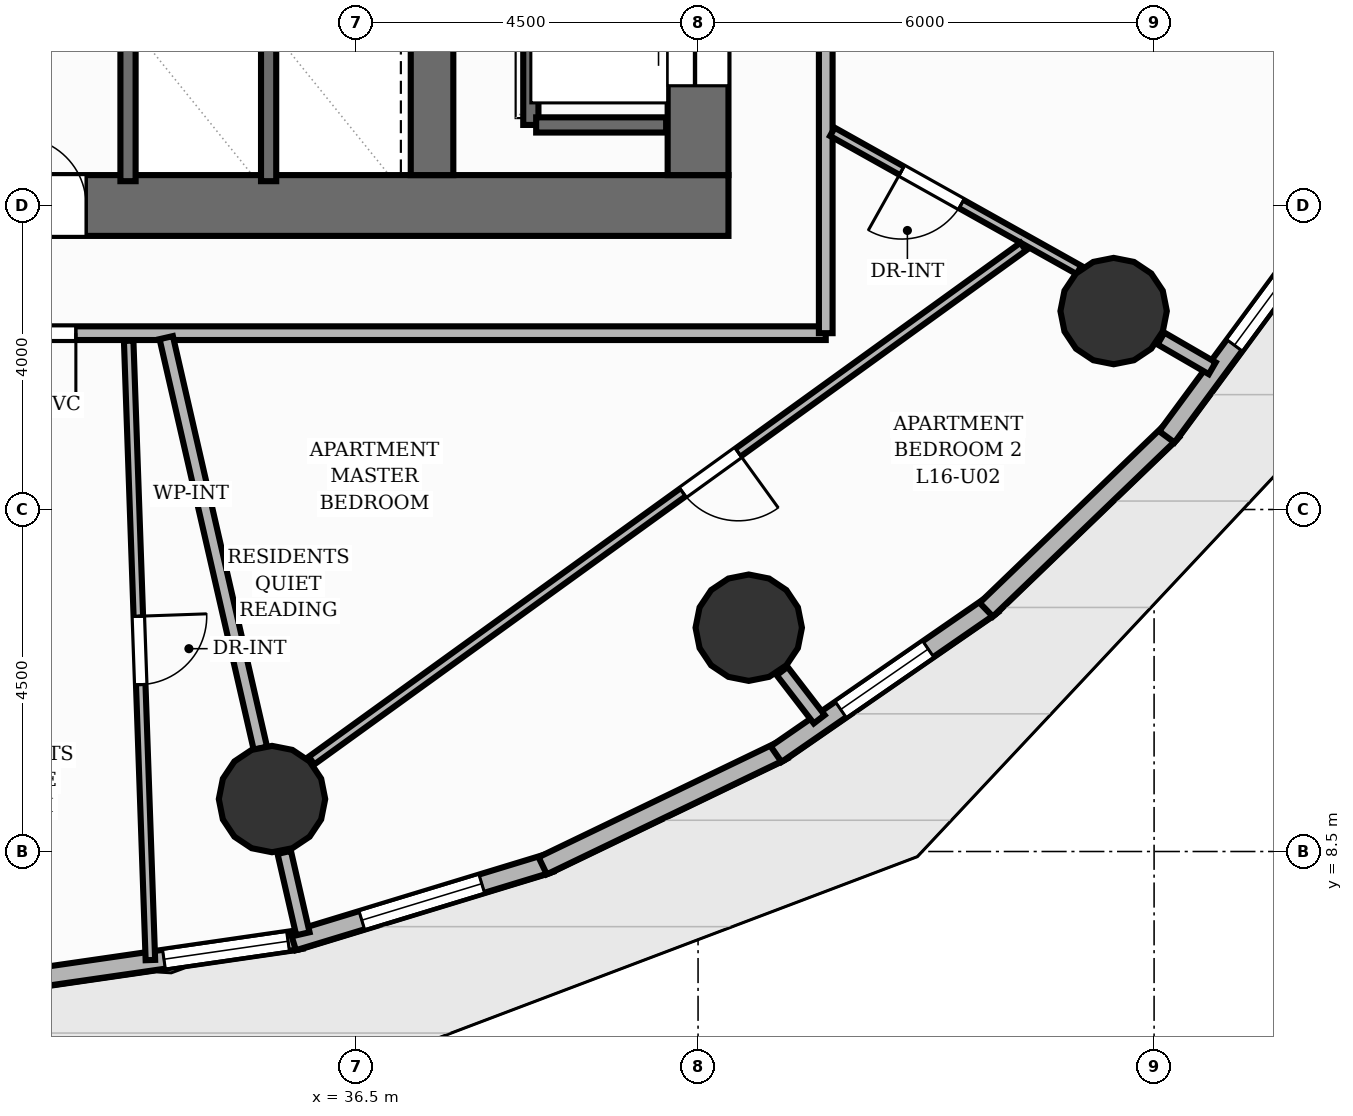
"""IFC4 building model, lengths in metres.
Left out: names, types, materials, properties, quantities, classifications, styles, units other than length and angle.
Written with IfcOpenShell. Run it as: python <this file> out.ifc"""

import sys

from ifc_helpers import new_model, si_unit, direction, frame, frame_2d, origin, origin_2d, place, context, subcontext, project, spatial, rectangle, circle, extrude, element, fill, save


model = new_model("IFC4")
c1 = context("Model", 3, precision=1e-05, world=origin(), true_north=direction((0.0, 1.0)))
c2 = subcontext(c1, "Body", "Model", "MODEL_VIEW")
j1 = project(units=[si_unit("LENGTHUNIT", "METRE"), si_unit("PLANEANGLEUNIT", "RADIAN")], contexts=[c1])
p1 = place(None, origin())
s1 = spatial("IfcSite", under=j1, at=p1, CompositionType="ELEMENT")
p2 = place(p1, origin())
s2 = spatial("IfcBuilding", under=s1, at=p2, CompositionType="ELEMENT")
p3 = place(p2, frame((0.0, 0.0, 56.8)))
s3 = spatial("IfcBuildingStorey", under=s2, at=p3, CompositionType="ELEMENT", Elevation=56.8)
p4 = place(p3, frame((22.6, 17.0, 0.0), z_axis=(0.0, 0.0, 1.0), x_axis=(1.0, 0.0, 0.0)))
e1 = element("IfcWall", 1, at=p4, inside=s3, PredefinedType="SHEAR", context=c2, shape_type="SweptSolid", body=[
    extrude(rectangle(XDim=18.8, YDim=0.8, at=frame_2d((9.4, 0.0))), origin(), (0.0, 0.0, 1.0), 3.2),
])
p5 = place(p4, frame((5.9, 0.0, 0.0)))
e2 = element("IfcOpeningElement", 2, at=p5, cuts=e1, PredefinedType="OPENING", context=c2, shape_type="SweptSolid", body=[
    extrude(rectangle(XDim=1.1, YDim=2.15, at=frame_2d((0.55, 1.075))), frame((0.0, 0.41, 0.0), z_axis=(0.0, -1.0, 0.0), x_axis=(1.0, 0.0, 0.0)), (0.0, 0.0, 1.0), 0.82),
])
p6 = place(p4, frame((9.45, 0.0, 0.0)))
e3 = element("IfcOpeningElement", 3, at=p6, cuts=e1, PredefinedType="OPENING", context=c2, shape_type="SweptSolid", body=[
    extrude(rectangle(XDim=0.9, YDim=2.1, at=frame_2d((0.45, 1.05))), frame((0.0, 0.41, 0.0), z_axis=(0.0, -1.0, 0.0), x_axis=(1.0, 0.0, 0.0)), (0.0, 0.0, 1.0), 0.82),
])
p7 = place(p3, frame((41.0, 17.4, 0.0), z_axis=(0.0, 0.0, 1.0), x_axis=(0.0, 1.0, 0.0)))
e4 = element("IfcWall", 4, at=p7, inside=s3, PredefinedType="SHEAR", context=c2, shape_type="SweptSolid", body=[
    extrude(rectangle(XDim=13.2, YDim=0.8, at=frame_2d((6.6, 0.0))), origin(), (0.0, 0.0, 1.0), 3.2),
])
p8 = place(p7, frame((1.175, 0.0, 0.0)))
e5 = element("IfcOpeningElement", 5, at=p8, cuts=e4, PredefinedType="OPENING", context=c2, shape_type="SweptSolid", body=[
    extrude(rectangle(XDim=1.05, YDim=2.15, at=frame_2d((0.525, 1.075))), frame((0.0, 0.41, 0.0), z_axis=(0.0, -1.0, 0.0), x_axis=(1.0, 0.0, 0.0)), (0.0, 0.0, 1.0), 0.82),
])
p9 = place(p7, frame((4.425, 0.0, 0.0)))
e6 = element("IfcOpeningElement", 6, at=p9, cuts=e4, PredefinedType="OPENING", context=c2, shape_type="SweptSolid", body=[
    extrude(rectangle(XDim=1.05, YDim=2.15, at=frame_2d((0.525, 1.075))), frame((0.0, 0.41, 0.0), z_axis=(0.0, -1.0, 0.0), x_axis=(1.0, 0.0, 0.0)), (0.0, 0.0, 1.0), 0.82),
])
p10 = place(p7, frame((7.725, 0.0, 0.0)))
e7 = element("IfcOpeningElement", 7, at=p10, cuts=e4, PredefinedType="OPENING", context=c2, shape_type="SweptSolid", body=[
    extrude(rectangle(XDim=1.05, YDim=2.15, at=frame_2d((0.525, 1.075))), frame((0.0, 0.41, 0.0), z_axis=(0.0, -1.0, 0.0), x_axis=(1.0, 0.0, 0.0)), (0.0, 0.0, 1.0), 0.82),
])
p11 = place(p7, frame((10.975, 0.0, 0.0)))
e8 = element("IfcOpeningElement", 8, at=p11, cuts=e4, PredefinedType="OPENING", context=c2, shape_type="SweptSolid", body=[
    extrude(rectangle(XDim=1.05, YDim=2.15, at=frame_2d((0.525, 1.075))), frame((0.0, 0.41, 0.0), z_axis=(0.0, -1.0, 0.0), x_axis=(1.0, 0.0, 0.0)), (0.0, 0.0, 1.0), 0.82),
])
p12 = place(p3, frame((37.5, 17.4, 0.0), z_axis=(0.0, 0.0, 1.0), x_axis=(0.0, 1.0, 0.0)))
e9 = element("IfcWall", 9, at=p12, inside=s3, PredefinedType="SHEAR", context=c2, shape_type="SweptSolid", body=[
    extrude(rectangle(XDim=13.2, YDim=0.56, at=frame_2d((6.6, 0.0))), origin(), (0.0, 0.0, 1.0), 3.2),
])
for number, where, z_axis, x_axis in (
    (10, (35.395, 9.19, 0.0), (0.0, 0.0, 1.0), (1.0, 0.0, 0.0)),
    (11, (41.667, 11.445, 0.0), (0.0, 0.0, 1.0), (1.0, 0.0, 0.0)),
    (12, (46.468, 15.611, 0.0), (0.0, 0.0, 1.0), (1.0, 0.0, 0.0)),
):
    element("IfcColumn", number, at=place(p3, frame(where, z_axis=z_axis, x_axis=x_axis)), inside=s3, PredefinedType="COLUMN", context=c2, shape_type="SweptSolid", body=[
        extrude(circle(Radius=0.7, at=origin_2d()), origin(), (0.0, 0.0, 1.0), 3.2),
    ])
p13 = place(p3, frame((35.779, 7.344, 0.0), z_axis=(0.0, 0.0, 1.0), x_axis=(-0.989638017979, -0.143584795051, 0.0)))
e13 = element("IfcWall", 13, at=p13, inside=s3, PredefinedType="SOLIDWALL", context=c2, shape_type="SweptSolid", body=[
    extrude(rectangle(XDim=3.538, YDim=0.25, at=frame_2d((1.769, 0.0))), origin(), (0.0, 0.0, 1.0), 2.96),
])
p14 = place(p13, frame((0.175, 0.0, 0.85)))
e14 = element("IfcOpeningElement", 14, at=p14, cuts=e13, PredefinedType="OPENING", context=c2, shape_type="SweptSolid", body=[
    extrude(rectangle(XDim=1.65, YDim=1.29, at=frame_2d((0.825, 0.645))), frame((0.0, 0.135, 0.0), z_axis=(0.0, -1.0, 0.0), x_axis=(1.0, 0.0, 0.0)), (0.0, 0.0, 1.0), 0.27),
])
p15 = place(p3, frame((39.057, 8.352, 0.0), z_axis=(0.0, 0.0, 1.0), x_axis=(-0.95658107252, -0.291466381759, 0.0)))
e15 = element("IfcWall", 15, at=p15, inside=s3, PredefinedType="SOLIDWALL", context=c2, shape_type="SweptSolid", body=[
    extrude(rectangle(XDim=3.538, YDim=0.25, at=frame_2d((1.769, 0.0))), origin(), (0.0, 0.0, 1.0), 2.96),
])
p16 = place(p15, frame((0.944, 0.0, 0.85)))
e16 = element("IfcOpeningElement", 16, at=p16, cuts=e15, PredefinedType="OPENING", context=c2, shape_type="SweptSolid", body=[
    extrude(rectangle(XDim=1.65, YDim=1.55, at=frame_2d((0.825, 0.775))), frame((0.0, 0.135, 0.0), z_axis=(0.0, -1.0, 0.0), x_axis=(1.0, 0.0, 0.0)), (0.0, 0.0, 1.0), 0.27),
])
p17 = place(p3, frame((42.121, 9.836, 0.0), z_axis=(0.0, 0.0, 1.0), x_axis=(-0.901067057596, -0.433679787073, 0.0)))
e17 = element("IfcWall", 17, at=p17, inside=s3, PredefinedType="SOLIDWALL", context=c2, shape_type="SweptSolid", body=[
    extrude(rectangle(XDim=3.513, YDim=0.25, at=frame_2d((1.756, 0.0))), origin(), (0.0, 0.0, 1.0), 2.96),
])
p18 = place(p3, frame((44.877, 11.751, 0.0), z_axis=(0.0, 0.0, 1.0), x_axis=(-0.822610496702, -0.568605285515, 0.0)))
e18 = element("IfcWall", 18, at=p18, inside=s3, PredefinedType="SOLIDWALL", context=c2, shape_type="SweptSolid", body=[
    extrude(rectangle(XDim=3.465, YDim=0.25, at=frame_2d((1.732, 0.0))), origin(), (0.0, 0.0, 1.0), 2.96),
])
p19 = place(p18, frame((1.032, 0.0, 0.85)))
e19 = element("IfcOpeningElement", 19, at=p19, cuts=e18, PredefinedType="OPENING", context=c2, shape_type="SweptSolid", body=[
    extrude(rectangle(XDim=1.4, YDim=1.29, at=frame_2d((0.7, 0.645))), frame((0.0, 0.135, 0.0), z_axis=(0.0, -1.0, 0.0), x_axis=(1.0, 0.0, 0.0)), (0.0, 0.0, 1.0), 0.27),
])
p20 = place(p3, frame((47.24, 14.039, 0.0), z_axis=(0.0, 0.0, 1.0), x_axis=(-0.720340150583, -0.693620982568, 0.0)))
e20 = element("IfcWall", 20, at=p20, inside=s3, PredefinedType="SOLIDWALL", context=c2, shape_type="SweptSolid", body=[
    extrude(rectangle(XDim=3.399, YDim=0.25, at=frame_2d((1.7, 0.0))), origin(), (0.0, 0.0, 1.0), 2.96),
])
p21 = place(p3, frame((49.14, 16.629, 0.0), z_axis=(0.0, 0.0, 1.0), x_axis=(-0.593762827217, -0.804640109003, 0.0)))
e21 = element("IfcWall", 21, at=p21, inside=s3, PredefinedType="SOLIDWALL", context=c2, shape_type="SweptSolid", body=[
    extrude(rectangle(XDim=3.323, YDim=0.25, at=frame_2d((1.661, 0.0))), origin(), (0.0, 0.0, 1.0), 2.96),
])
p22 = place(p21, frame((0.175, 0.0, 0.85)))
e22 = element("IfcOpeningElement", 22, at=p22, cuts=e21, PredefinedType="OPENING", context=c2, shape_type="SweptSolid", body=[
    extrude(rectangle(XDim=1.65, YDim=1.55, at=frame_2d((0.825, 0.775))), frame((0.0, 0.135, 0.0), z_axis=(0.0, -1.0, 0.0), x_axis=(1.0, 0.0, 0.0)), (0.0, 0.0, 1.0), 0.27),
])
p23 = place(p3, frame((38.8, 18.06, 0.0), z_axis=(0.0, 0.0, 1.0), x_axis=(0.0, 1.0, 0.0)))
e23 = element("IfcWall", 23, at=p23, inside=s3, PredefinedType="SHEAR", context=c2, shape_type="SweptSolid", body=[
    extrude(rectangle(XDim=11.88, YDim=0.2, at=frame_2d((5.94, 0.0))), origin(), (0.0, 0.0, 1.0), 3.2),
])
p24 = place(p3, frame((38.87, 18.06, 0.0), z_axis=(0.0, 0.0, 1.0), x_axis=(1.0, 0.0, 0.0)))
e24 = element("IfcWall", 24, at=p24, inside=s3, PredefinedType="SHEAR", context=c2, shape_type="SweptSolid", body=[
    extrude(rectangle(XDim=1.71, YDim=0.2, at=frame_2d((0.855, 0.0))), origin(), (0.0, 0.0, 1.0), 3.2),
])
for number, where, z_axis, x_axis in (
    (25, (33.5, 17.32, 0.0), (0.0, 0.0, 1.0), (0.0, 1.0, 0.0)),
    (26, (35.35, 17.32, 0.0), (0.0, 0.0, 1.0), (0.0, 1.0, 0.0)),
):
    element("IfcWall", number, at=place(p3, frame(where, z_axis=z_axis, x_axis=x_axis)), inside=s3, PredefinedType="SHEAR", context=c2, shape_type="SweptSolid", body=[
        extrude(rectangle(XDim=1.86, YDim=0.2, at=frame_2d((0.93, 0.0))), origin(), (0.0, 0.0, 1.0), 3.2),
    ])
p25 = place(p3, frame((35.555, 8.488, 0.0), z_axis=(0.0, 0.0, 1.0), x_axis=(0.223512485262, -0.974701066446, 0.0)))
e27 = element("IfcWall", 27, at=p25, inside=s3, PredefinedType="PARTITIONING", context=c2, shape_type="SweptSolid", body=[
    extrude(rectangle(XDim=1.099, YDim=0.18, at=frame_2d((0.549, 0.0))), origin(), (0.0, 0.0, 1.0), 2.178),
])
p26 = place(p3, frame((42.106, 10.874, 0.0), z_axis=(0.0, 0.0, 1.0), x_axis=(0.609961416057, -0.792431114307, 0.0)))
e28 = element("IfcWall", 28, at=p26, inside=s3, PredefinedType="PARTITIONING", context=c2, shape_type="SweptSolid", body=[
    extrude(rectangle(XDim=0.8, YDim=0.18, at=frame_2d((0.4, 0.0))), origin(), (0.0, 0.0, 1.0), 2.178),
])
p27 = place(p3, frame((47.091, 15.25, 0.0), z_axis=(0.0, 0.0, 1.0), x_axis=(0.86504748832, -0.501689986895, 0.0)))
e29 = element("IfcWall", 29, at=p27, inside=s3, PredefinedType="PARTITIONING", context=c2, shape_type="SweptSolid", body=[
    extrude(rectangle(XDim=0.78, YDim=0.18, at=frame_2d((0.39, 0.0))), origin(), (0.0, 0.0, 1.0), 2.178),
])
p28 = place(p3, frame((42.68, 15.32, 0.0), z_axis=(0.0, 0.0, 1.0), x_axis=(-1.0, 0.0, 0.0)))
e30 = element("IfcWall", 30, at=p28, inside=s3, PredefinedType="PARTITIONING", context=c2, shape_type="SweptSolid", body=[
    extrude(rectangle(XDim=13.87, YDim=0.18, at=frame_2d((6.935, 0.0))), origin(), (0.0, 0.0, 1.0), 2.955),
])
p29 = place(p28, frame((9.866, 0.0, 0.0)))
e31 = element("IfcOpeningElement", 31, at=p29, cuts=e30, PredefinedType="OPENING", context=c2, shape_type="SweptSolid", body=[
    extrude(rectangle(XDim=0.9, YDim=2.1, at=frame_2d((0.45, 1.05))), frame((0.0, 0.1, 0.0), z_axis=(0.0, -1.0, 0.0), x_axis=(1.0, 0.0, 0.0)), (0.0, 0.0, 1.0), 0.2),
])
p30 = place(p3, frame((42.68, 30.109, 0.0), z_axis=(0.0, 0.0, 1.0), x_axis=(0.0, -1.0, 0.0)))
e32 = element("IfcWall", 32, at=p30, inside=s3, PredefinedType="PARTITIONING", context=c2, shape_type="SweptSolid", body=[
    extrude(rectangle(XDim=14.789, YDim=0.18, at=frame_2d((7.395, 0.0))), origin(), (0.0, 0.0, 1.0), 2.955),
])
p31 = place(p30, frame((9.4, 0.0, 0.0)))
e33 = element("IfcOpeningElement", 33, at=p31, cuts=e32, PredefinedType="OPENING", context=c2, shape_type="SweptSolid", body=[
    extrude(rectangle(XDim=1.05, YDim=2.15, at=frame_2d((0.525, 1.075))), frame((0.0, 0.1, 0.0), z_axis=(0.0, -1.0, 0.0), x_axis=(1.0, 0.0, 0.0)), (0.0, 0.0, 1.0), 0.2),
])
p32 = place(p3, frame((33.509, 15.22, 0.0), z_axis=(0.0, 0.0, 1.0), x_axis=(0.035033610305, -0.999386134659, 0.0)))
e34 = element("IfcWall", 34, at=p32, inside=s3, PredefinedType="PARTITIONING", context=c2, shape_type="SweptSolid", body=[
    extrude(rectangle(XDim=8.154, YDim=0.125, at=frame_2d((4.077, 0.0))), origin(), (0.0, 0.0, 1.0), 2.955),
])
p33 = place(p32, frame((3.627, 0.0, 0.0)))
e35 = element("IfcOpeningElement", 35, at=p33, cuts=e34, PredefinedType="OPENING", context=c2, shape_type="SweptSolid", body=[
    extrude(rectangle(XDim=0.9, YDim=2.1, at=frame_2d((0.45, 1.05))), frame((0.0, 0.073, 0.0), z_axis=(0.0, -1.0, 0.0), x_axis=(1.0, 0.0, 0.0)), (0.0, 0.0, 1.0), 0.145),
])
p34 = place(p3, frame((34.003, 15.261, 0.0), z_axis=(0.0, 0.0, 1.0), x_axis=(0.22340578764, -0.974725527546, 0.0)))
e36 = element("IfcWall", 36, at=p34, inside=s3, PredefinedType="PARTITIONING", context=c2, shape_type="SweptSolid", body=[
    extrude(rectangle(XDim=5.545, YDim=0.18, at=frame_2d((2.772, 0.0))), origin(), (0.0, 0.0, 1.0), 2.178),
])
p35 = place(p3, frame((46.011, 16.152, 0.0), z_axis=(0.0, 0.0, 1.0), x_axis=(-0.872501537555, 0.488611365978, 0.0)))
e37 = element("IfcWall", 37, at=p35, inside=s3, PredefinedType="PARTITIONING", context=c2, shape_type="SweptSolid", body=[
    extrude(rectangle(XDim=3.719, YDim=0.125, at=frame_2d((1.859, 0.0))), origin(), (0.0, 0.0, 1.0), 2.178),
])
p36 = place(p35, frame((1.773, 0.0, 0.0)))
e38 = element("IfcOpeningElement", 38, at=p36, cuts=e37, PredefinedType="OPENING", context=c2, shape_type="SweptSolid", body=[
    extrude(rectangle(XDim=0.9, YDim=2.1, at=frame_2d((0.45, 1.05))), frame((0.0, 0.073, 0.0), z_axis=(0.0, -1.0, 0.0), x_axis=(1.0, 0.0, 0.0)), (0.0, 0.0, 1.0), 0.145),
])
p37 = place(p3, frame((45.278, 16.459, 0.0), z_axis=(0.0, 0.0, 1.0), x_axis=(-0.810668637761, -0.585505217526, 0.0)))
e39 = element("IfcWall", 39, at=p37, inside=s3, PredefinedType="PARTITIONING", context=c2, shape_type="SweptSolid", body=[
    extrude(rectangle(XDim=11.55, YDim=0.125, at=frame_2d((5.775, 0.0))), origin(), (0.0, 0.0, 1.0), 2.955),
])
p38 = place(p37, frame((4.625, 0.0, 0.0)))
e40 = element("IfcOpeningElement", 40, at=p38, cuts=e39, PredefinedType="OPENING", context=c2, shape_type="SweptSolid", body=[
    extrude(rectangle(XDim=0.9, YDim=2.1, at=frame_2d((0.45, 1.05))), frame((0.0, 0.073, 0.0), z_axis=(0.0, -1.0, 0.0), x_axis=(1.0, 0.0, 0.0)), (0.0, 0.0, 1.0), 0.145),
])
p39 = place(p14, origin())
e41 = element("IfcWindow", 41, at=p39, inside=s3, PartitioningType="SINGLE_PANEL", PredefinedType="WINDOW", context=c2, shape_type="SweptSolid", body=[
    extrude(rectangle(XDim=1.65, YDim=1.29, at=frame_2d((0.825, 0.645))), frame((0.0, 0.03, 0.0), z_axis=(0.0, -1.0, 0.0), x_axis=(1.0, 0.0, 0.0)), (0.0, 0.0, 1.0), 0.06),
])
fill(e14, e41)
p40 = place(p16, origin())
e42 = element("IfcWindow", 42, at=p40, inside=s3, PartitioningType="SINGLE_PANEL", PredefinedType="WINDOW", context=c2, shape_type="SweptSolid", body=[
    extrude(rectangle(XDim=1.65, YDim=1.55, at=frame_2d((0.825, 0.775))), frame((0.0, 0.03, 0.0), z_axis=(0.0, -1.0, 0.0), x_axis=(1.0, 0.0, 0.0)), (0.0, 0.0, 1.0), 0.06),
])
fill(e16, e42)
p41 = place(p19, origin())
e43 = element("IfcWindow", 43, at=p41, inside=s3, PartitioningType="SINGLE_PANEL", PredefinedType="WINDOW", context=c2, shape_type="SweptSolid", body=[
    extrude(rectangle(XDim=1.4, YDim=1.29, at=frame_2d((0.7, 0.645))), frame((0.0, 0.03, 0.0), z_axis=(0.0, -1.0, 0.0), x_axis=(1.0, 0.0, 0.0)), (0.0, 0.0, 1.0), 0.06),
])
fill(e19, e43)
p42 = place(p22, origin())
e44 = element("IfcWindow", 44, at=p42, inside=s3, PartitioningType="SINGLE_PANEL", PredefinedType="WINDOW", context=c2, shape_type="SweptSolid", body=[
    extrude(rectangle(XDim=1.65, YDim=1.55, at=frame_2d((0.825, 0.775))), frame((0.0, 0.03, 0.0), z_axis=(0.0, -1.0, 0.0), x_axis=(1.0, 0.0, 0.0)), (0.0, 0.0, 1.0), 0.06),
])
fill(e22, e44)
p43 = place(p8, origin())
e45 = element("IfcDoor", 45, at=p43, inside=s3, OperationType="DOUBLE_DOOR_SLIDING", PredefinedType="DOOR", context=c2, shape_type="SweptSolid", body=[
    extrude(rectangle(XDim=1.05, YDim=2.15, at=frame_2d((0.525, 1.075))), frame((0.0, 0.025, 0.0), z_axis=(0.0, -1.0, 0.0), x_axis=(1.0, 0.0, 0.0)), (0.0, 0.0, 1.0), 0.05),
])
fill(e5, e45)
p44 = place(p6, origin())
e46 = element("IfcDoor", 46, at=p44, inside=s3, OperationType="SINGLE_SWING_LEFT", PredefinedType="DOOR", context=c2, shape_type="SweptSolid", body=[
    extrude(rectangle(XDim=0.9, YDim=2.1, at=frame_2d((0.45, 1.05))), frame((0.0, 0.025, 0.0), z_axis=(0.0, -1.0, 0.0), x_axis=(1.0, 0.0, 0.0)), (0.0, 0.0, 1.0), 0.05),
])
fill(e3, e46)
p45 = place(p29, origin())
e47 = element("IfcDoor", 47, at=p45, inside=s3, OperationType="SINGLE_SWING_LEFT", PredefinedType="DOOR", context=c2, shape_type="SweptSolid", body=[
    extrude(rectangle(XDim=0.9, YDim=2.1, at=frame_2d((0.45, 1.05))), frame((0.0, 0.025, 0.0), z_axis=(0.0, -1.0, 0.0), x_axis=(1.0, 0.0, 0.0)), (0.0, 0.0, 1.0), 0.05),
])
fill(e31, e47)
p46 = place(p33, origin())
e48 = element("IfcDoor", 48, at=p46, inside=s3, OperationType="SINGLE_SWING_LEFT", PredefinedType="DOOR", context=c2, shape_type="SweptSolid", body=[
    extrude(rectangle(XDim=0.9, YDim=2.1, at=frame_2d((0.45, 1.05))), frame((0.0, 0.025, 0.0), z_axis=(0.0, -1.0, 0.0), x_axis=(1.0, 0.0, 0.0)), (0.0, 0.0, 1.0), 0.05),
])
fill(e35, e48)
p47 = place(p36, origin())
e49 = element("IfcDoor", 49, at=p47, inside=s3, OperationType="SINGLE_SWING_RIGHT", PredefinedType="DOOR", context=c2, shape_type="SweptSolid", body=[
    extrude(rectangle(XDim=0.9, YDim=2.1, at=frame_2d((0.45, 1.05))), frame((0.0, 0.025, 0.0), z_axis=(0.0, -1.0, 0.0), x_axis=(1.0, 0.0, 0.0)), (0.0, 0.0, 1.0), 0.05),
])
fill(e38, e49)
p48 = place(p38, origin())
e50 = element("IfcDoor", 50, at=p48, inside=s3, OperationType="SINGLE_SWING_LEFT", PredefinedType="DOOR", context=c2, shape_type="SweptSolid", body=[
    extrude(rectangle(XDim=0.9, YDim=2.1, at=frame_2d((0.45, 1.05))), frame((0.0, 0.025, 0.0), z_axis=(0.0, -1.0, 0.0), x_axis=(1.0, 0.0, 0.0)), (0.0, 0.0, 1.0), 0.05),
])
fill(e40, e50)
save(model, sys.argv[1])
